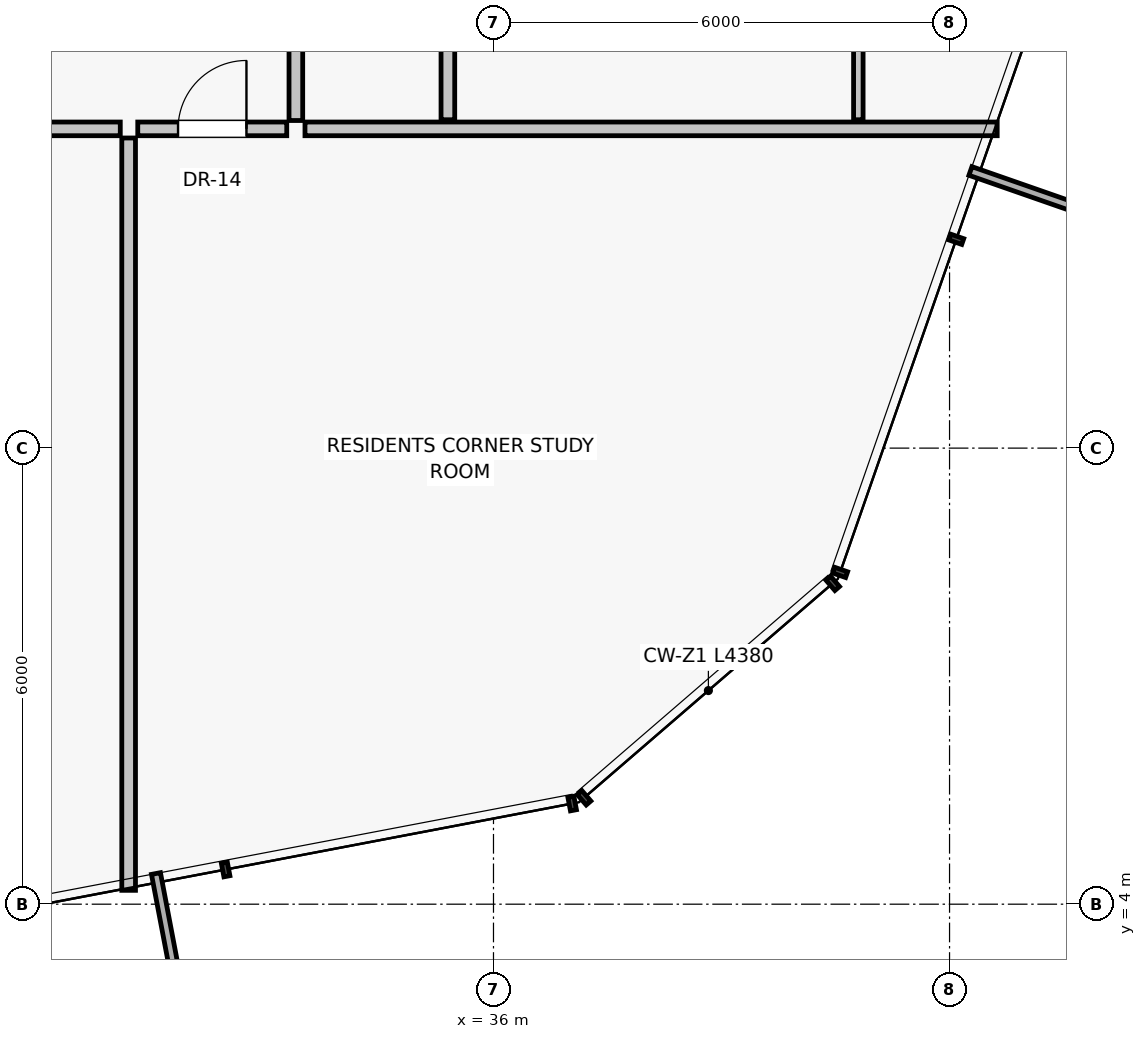
"""IFC4 building model, lengths in metres.
Left out: names, types, materials, properties, quantities, classifications, styles, units other than length and angle.
Written with IfcOpenShell. Run it as: python <this file> out.ifc"""

import sys

from ifc_helpers import new_model, si_unit, direction, frame, frame_2d, origin, place, context, subcontext, project, spatial, rectangle, extrude, source, transform, mapped, element, fill, save


model = new_model("IFC4")
c1 = context("Model", 3, precision=1e-05, world=origin(), true_north=direction((0.0, 1.0)))
c2 = subcontext(c1, "Body", "Model", "MODEL_VIEW")
j1 = project(units=[si_unit("LENGTHUNIT", "METRE"), si_unit("PLANEANGLEUNIT", "RADIAN")], contexts=[c1])
p1 = place(None, origin())
s1 = spatial("IfcSite", under=j1, at=p1, CompositionType="ELEMENT")
p2 = place(p1, origin())
s2 = spatial("IfcBuilding", under=s1, at=p2, CompositionType="ELEMENT")
p3 = place(p2, frame((0.0, 0.0, 60.85)))
s3 = spatial("IfcBuildingStorey", under=s2, at=p3, CompositionType="ELEMENT", Elevation=60.85)
p4 = place(p3, frame((31.2, 14.08, 0.0), z_axis=(0.0, 0.0, 1.0), x_axis=(0.0, -1.0, 0.0)))
e1 = element("IfcWall", 1, at=p4, inside=s3, PredefinedType="PARTITIONING", context=c2, shape_type="SweptSolid", body=[
    extrude(rectangle(XDim=9.898, YDim=0.18, at=frame_2d((4.949, 0.0))), origin(), (0.0, 0.0, 1.0), 3.0),
])
p5 = place(p3, frame((25.502, 14.2, 0.0), z_axis=(0.0, 0.0, 1.0), x_axis=(1.0, 0.0, 0.0)))
e2 = element("IfcWall", 2, at=p5, inside=s3, PredefinedType="PARTITIONING", context=c2, shape_type="SweptSolid", body=[
    extrude(rectangle(XDim=5.588, YDim=0.18, at=frame_2d((2.794, 0.0))), origin(), (0.0, 0.0, 1.0), 3.0),
])
p6 = place(p5, frame((3.336, 0.0, 0.0)))
e3 = element("IfcOpeningElement", 3, at=p6, cuts=e2, PredefinedType="OPENING", context=c2, shape_type="SweptSolid", body=[
    extrude(rectangle(XDim=0.95, YDim=2.02, at=frame_2d((0.475, 1.01))), frame((0.0, 0.1, 0.0), z_axis=(0.0, -1.0, 0.0), x_axis=(1.0, 0.0, 0.0)), (0.0, 0.0, 1.0), 0.2),
])
p7 = place(p3, frame((33.52, 14.2, 0.0), z_axis=(0.0, 0.0, 1.0), x_axis=(1.0, 0.0, 0.0)))
e4 = element("IfcWall", 4, at=p7, inside=s3, PredefinedType="PARTITIONING", context=c2, shape_type="SweptSolid", body=[
    extrude(rectangle(XDim=9.107, YDim=0.18, at=frame_2d((4.553, 0.0))), origin(), (0.0, 0.0, 1.0), 3.0),
])
p8 = place(p3, frame((33.4, 14.31, 0.0), z_axis=(0.0, 0.0, 1.0), x_axis=(0.0, 1.0, 0.0)))
e5 = element("IfcWall", 5, at=p8, inside=s3, PredefinedType="PARTITIONING", context=c2, shape_type="SweptSolid", body=[
    extrude(rectangle(XDim=4.18, YDim=0.18, at=frame_2d((2.09, 0.0))), origin(), (0.0, 0.0, 1.0), 3.0),
])
p9 = place(p8, frame((1.59, 0.0, 0.0)))
e6 = element("IfcOpeningElement", 6, at=p9, cuts=e5, PredefinedType="OPENING", context=c2, shape_type="SweptSolid", body=[
    extrude(rectangle(XDim=1.0, YDim=2.01, at=frame_2d((0.5, 1.005))), frame((0.0, 0.1, 0.0), z_axis=(0.0, -1.0, 0.0), x_axis=(1.0, 0.0, 0.0)), (0.0, 0.0, 1.0), 0.2),
])
p10 = place(p3, frame((40.8, 14.32, 0.0), z_axis=(0.0, 0.0, 1.0), x_axis=(0.0, 1.0, 0.0)))
e7 = element("IfcWall", 7, at=p10, inside=s3, PredefinedType="PARTITIONING", context=c2, shape_type="SweptSolid", body=[
    extrude(rectangle(XDim=4.18, YDim=0.125, at=frame_2d((2.09, 0.0))), origin(), (0.0, 0.0, 1.0), 3.0),
])
p11 = place(p3, frame((35.4, 14.32, 0.0), z_axis=(0.0, 0.0, 1.0), x_axis=(0.0, 1.0, 0.0)))
e8 = element("IfcWall", 8, at=p11, inside=s3, PredefinedType="PARTITIONING", context=c2, shape_type="SweptSolid", body=[
    extrude(rectangle(XDim=4.18, YDim=0.18, at=frame_2d((2.09, 0.0))), origin(), (0.0, 0.0, 1.0), 3.0),
])
p12 = place(p3, frame((31.32, 14.2, 0.0), z_axis=(0.0, 0.0, 1.0), x_axis=(1.0, 0.0, 0.0)))
e9 = element("IfcWall", 9, at=p12, inside=s3, PredefinedType="PARTITIONING", context=c2, shape_type="SweptSolid", body=[
    extrude(rectangle(XDim=1.96, YDim=0.18, at=frame_2d((0.98, 0.0))), origin(), (0.0, 0.0, 1.0), 3.0),
])
p13 = place(p12, frame((0.53, 0.0, 0.0)))
e10 = element("IfcOpeningElement", 10, at=p13, cuts=e9, PredefinedType="OPENING", context=c2, shape_type="SweptSolid", body=[
    extrude(rectangle(XDim=0.9, YDim=2.01, at=frame_2d((0.45, 1.005))), frame((0.0, 0.1, 0.0), z_axis=(0.0, -1.0, 0.0), x_axis=(1.0, 0.0, 0.0)), (0.0, 0.0, 1.0), 0.2),
])
m1 = source(origin(), c2, "Body", "SweptSolid", [
    extrude(rectangle(XDim=0.9, YDim=2.01, at=frame_2d((0.45, 1.005))), frame((0.0, 0.025, 0.0), z_axis=(0.0, -1.0, 0.0), x_axis=(1.0, 0.0, 0.0)), (0.0, 0.0, 1.0), 0.05),
])
p14 = place(p13, origin())
e11 = element("IfcDoor", 11, at=p14, inside=s3, OperationType="SINGLE_SWING_RIGHT", PredefinedType="DOOR", context=c2, shape_type="MappedRepresentation", body=[
    mapped(m1, transform((0.0, 0.0, 0.0), scale=1.0)),
])
fill(e10, e11)
save(model, sys.argv[1])
